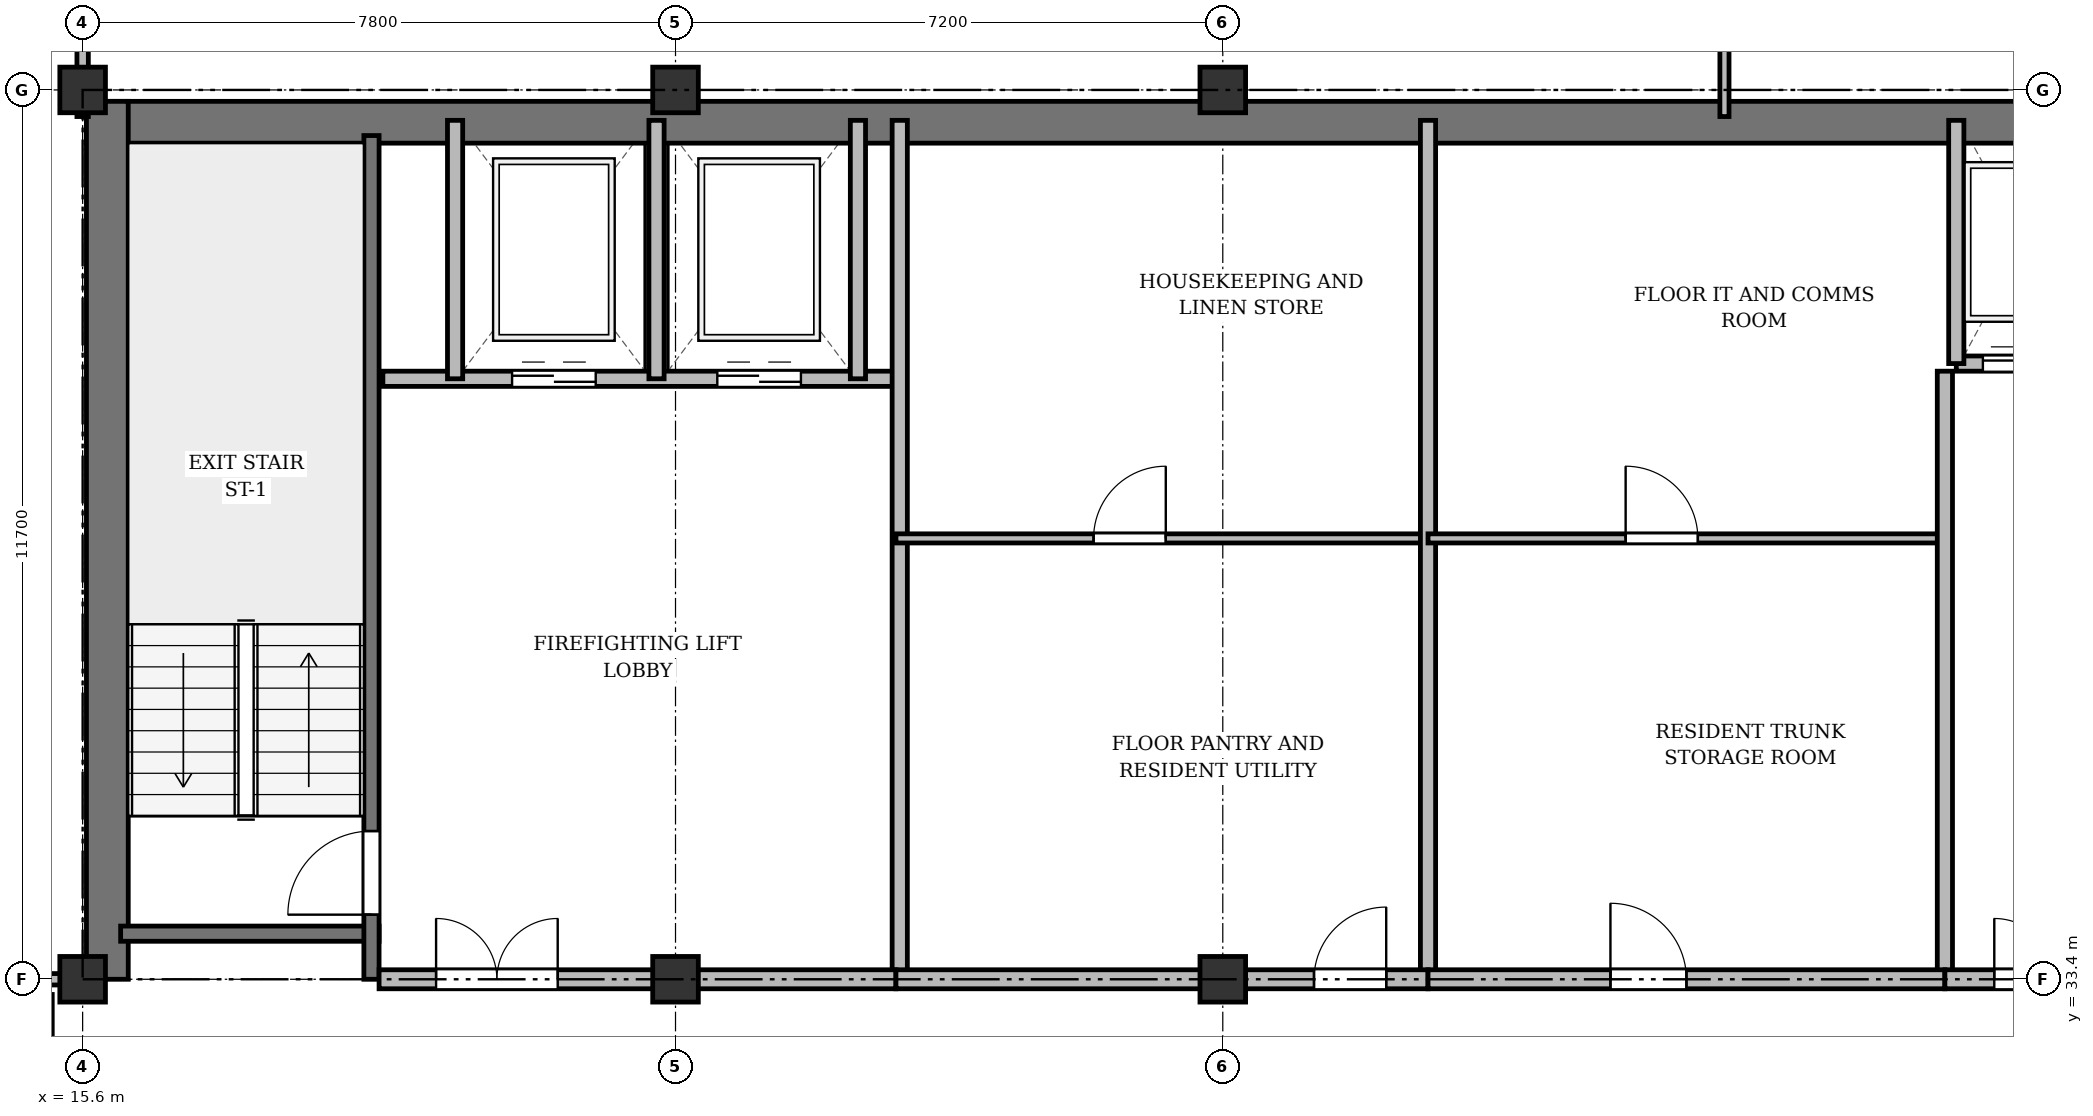
"""IFC4 building model, lengths in metres.
Left out: names, types, materials, properties, quantities, classifications, styles, units other than length and angle.
Written with IfcOpenShell. Run it as: python <this file> out.ifc"""

import sys

from ifc_helpers import new_model, si_unit, direction, frame, frame_2d, origin, origin_2d, place, context, subcontext, project, spatial, rectangle, extrude, source, transform, mapped, element, fill, save


model = new_model("IFC4")
c1 = context("Model", 3, precision=1e-05, world=origin(), true_north=direction((0.0, 1.0)))
c2 = subcontext(c1, "Body", "Model", "MODEL_VIEW")
j1 = project(units=[si_unit("LENGTHUNIT", "METRE"), si_unit("PLANEANGLEUNIT", "RADIAN")], contexts=[c1])
p1 = place(None, origin())
s1 = spatial("IfcSite", under=j1, at=p1, CompositionType="ELEMENT")
p2 = place(p1, origin())
s2 = spatial("IfcBuilding", under=s1, at=p2, CompositionType="ELEMENT")
p3 = place(p2, frame((0.0, 0.0, 295.5)))
s3 = spatial("IfcBuildingStorey", under=s2, at=p3, CompositionType="ELEMENT", Elevation=295.5)
m1 = source(origin(), c2, "Body", "SweptSolid", [
    extrude(rectangle(XDim=0.6, YDim=0.6, at=origin_2d()), origin(), (0.0, 0.0, 1.0), 3.6),
])
for number, where, z_axis, x_axis in (
    (1, (15.6, 33.4, 0.0), (0.0, 0.0, 1.0), (1.0, 0.0, 0.0)),
    (2, (15.6, 45.1, 0.0), (0.0, 0.0, 1.0), (1.0, 0.0, 0.0)),
    (3, (23.4, 33.4, 0.0), (0.0, 0.0, 1.0), (1.0, 0.0, 0.0)),
    (4, (23.4, 45.1, 0.0), (0.0, 0.0, 1.0), (1.0, 0.0, 0.0)),
    (5, (30.6, 33.4, 0.0), (0.0, 0.0, 1.0), (1.0, 0.0, 0.0)),
    (6, (30.6, 45.1, 0.0), (0.0, 0.0, 1.0), (1.0, 0.0, 0.0)),
):
    element("IfcColumn", number, at=place(p3, frame(where, z_axis=z_axis, x_axis=x_axis)), inside=s3, PredefinedType="COLUMN", context=c2, shape_type="MappedRepresentation", body=[
        mapped(m1, transform((0.0, 0.0, 0.0), x_axis=(1.0, 0.0, 0.0), y_axis=(0.0, 1.0, 0.0), z_axis=(0.0, 0.0, 1.0), scale=1.0)),
    ])
p4 = place(p3, frame((15.65, 44.675, 0.0), z_axis=(0.0, 0.0, 1.0), x_axis=(1.0, 0.0, 0.0)))
e7 = element("IfcWall", 7, at=p4, inside=s3, PredefinedType="SHEAR", context=c2, shape_type="SweptSolid", body=[
    extrude(rectangle(XDim=43.1, YDim=0.55, at=frame_2d((21.55, 0.0))), origin(), (0.0, 0.0, 1.0), 3.26),
])
p5 = place(p3, frame((15.925, 33.4, 0.0), z_axis=(0.0, 0.0, 1.0), x_axis=(0.0, 1.0, 0.0)))
e8 = element("IfcWall", 8, at=p5, inside=s3, PredefinedType="SHEAR", context=c2, shape_type="SweptSolid", body=[
    extrude(rectangle(XDim=11.55, YDim=0.55, at=frame_2d((5.775, 0.0))), origin(), (0.0, 0.0, 1.0), 3.26),
])
p6 = place(p3, frame((16.1, 34.0, 0.0), z_axis=(0.0, 0.0, 1.0), x_axis=(1.0, 0.0, 0.0)))
e9 = element("IfcWall", 9, at=p6, inside=s3, PredefinedType="SHEAR", context=c2, shape_type="SweptSolid", body=[
    extrude(rectangle(XDim=3.4, YDim=0.2, at=frame_2d((1.7, 0.0))), origin(), (0.0, 0.0, 1.0), 3.26),
])
p7 = place(p3, frame((19.4, 33.4, 0.0), z_axis=(0.0, 0.0, 1.0), x_axis=(0.0, 1.0, 0.0)))
e10 = element("IfcWall", 10, at=p7, inside=s3, PredefinedType="SHEAR", context=c2, shape_type="SweptSolid", body=[
    extrude(rectangle(XDim=11.1, YDim=0.2, at=frame_2d((5.55, 0.0))), origin(), (0.0, 0.0, 1.0), 3.26),
])
p8 = place(p7, frame((0.85, 0.0, 0.0)))
e11 = element("IfcOpeningElement", 11, at=p8, cuts=e10, PredefinedType="OPENING", context=c2, shape_type="SweptSolid", body=[
    extrude(rectangle(XDim=1.1, YDim=2.15, at=frame_2d((0.55, 1.075))), frame((0.0, 0.11, 0.0), z_axis=(0.0, -1.0, 0.0), x_axis=(1.0, 0.0, 0.0)), (0.0, 0.0, 1.0), 0.22),
])
p9 = place(p3, frame((15.1, 23.2, 0.0), z_axis=(0.0, 0.0, 1.0), x_axis=(0.0, 1.0, 0.0)))
e12 = element("IfcWall", 12, at=p9, inside=s3, PredefinedType="SHEAR", context=c2, shape_type="SweptSolid", body=[
    extrude(rectangle(XDim=10.0, YDim=0.2, at=frame_2d((5.0, 0.0))), origin(), (0.0, 0.0, 1.0), 3.26),
])
p10 = place(p3, frame((19.55, 41.3, 0.0), z_axis=(0.0, 0.0, 1.0), x_axis=(1.0, 0.0, 0.0)))
e13 = element("IfcWall", 13, at=p10, inside=s3, PredefinedType="SOLIDWALL", context=c2, shape_type="SweptSolid", body=[
    extrude(rectangle(XDim=6.75, YDim=0.2, at=frame_2d((3.375, 0.0))), origin(), (0.0, 0.0, 1.0), 3.26),
])
p11 = place(p10, frame((1.7, 0.0, 0.0)))
e14 = element("IfcOpeningElement", 14, at=p11, cuts=e13, PredefinedType="OPENING", context=c2, shape_type="SweptSolid", body=[
    extrude(rectangle(XDim=1.1, YDim=2.15, at=frame_2d((0.55, 1.075))), frame((0.0, 0.11, 0.0), z_axis=(0.0, -1.0, 0.0), x_axis=(1.0, 0.0, 0.0)), (0.0, 0.0, 1.0), 0.22),
])
p12 = place(p10, frame((4.4, 0.0, 0.0)))
e15 = element("IfcOpeningElement", 15, at=p12, cuts=e13, PredefinedType="OPENING", context=c2, shape_type="SweptSolid", body=[
    extrude(rectangle(XDim=1.1, YDim=2.15, at=frame_2d((0.55, 1.075))), frame((0.0, 0.11, 0.0), z_axis=(0.0, -1.0, 0.0), x_axis=(1.0, 0.0, 0.0)), (0.0, 0.0, 1.0), 0.22),
])
for number, where, z_axis, x_axis in (
    (16, (20.5, 41.3, 0.0), (0.0, 0.0, 1.0), (0.0, 1.0, 0.0)),
    (17, (23.15, 41.3, 0.0), (0.0, 0.0, 1.0), (0.0, 1.0, 0.0)),
    (18, (25.8, 41.3, 0.0), (0.0, 0.0, 1.0), (0.0, 1.0, 0.0)),
):
    element("IfcWall", number, at=place(p3, frame(where, z_axis=z_axis, x_axis=x_axis)), inside=s3, PredefinedType="SOLIDWALL", context=c2, shape_type="SweptSolid", body=[
        extrude(rectangle(XDim=3.4, YDim=0.2, at=frame_2d((1.7, 0.0))), origin(), (0.0, 0.0, 1.0), 3.26),
    ])
p13 = place(p3, frame((26.35, 33.4, 0.0), z_axis=(0.0, 0.0, 1.0), x_axis=(0.0, 1.0, 0.0)))
e19 = element("IfcWall", 19, at=p13, inside=s3, PredefinedType="SOLIDWALL", context=c2, shape_type="SweptSolid", body=[
    extrude(rectangle(XDim=11.3, YDim=0.2, at=frame_2d((5.65, 0.0))), origin(), (0.0, 0.0, 1.0), 2.81),
])
p14 = place(p3, frame((19.5, 33.4, 0.0), z_axis=(0.0, 0.0, 1.0), x_axis=(1.0, 0.0, 0.0)))
e20 = element("IfcWall", 20, at=p14, inside=s3, PredefinedType="PARTITIONING", context=c2, shape_type="SweptSolid", body=[
    extrude(rectangle(XDim=6.8, YDim=0.25, at=frame_2d((3.4, 0.0))), origin(), (0.0, 0.0, 1.0), 2.81),
])
p15 = place(p14, frame((0.75, 0.0, 0.0)))
e21 = element("IfcOpeningElement", 21, at=p15, cuts=e20, PredefinedType="OPENING", context=c2, shape_type="SweptSolid", body=[
    extrude(rectangle(XDim=1.6, YDim=2.2, at=frame_2d((0.8, 1.1))), frame((0.0, 0.135, 0.0), z_axis=(0.0, -1.0, 0.0), x_axis=(1.0, 0.0, 0.0)), (0.0, 0.0, 1.0), 0.27),
])
p16 = place(p3, frame((26.3, 39.2, 0.0), z_axis=(0.0, 0.0, 1.0), x_axis=(1.0, 0.0, 0.0)))
e22 = element("IfcWall", 22, at=p16, inside=s3, PredefinedType="PARTITIONING", context=c2, shape_type="SweptSolid", body=[
    extrude(rectangle(XDim=7.0, YDim=0.12, at=frame_2d((3.5, 0.0))), origin(), (0.0, 0.0, 1.0), 2.76),
])
p17 = place(p16, frame((2.6, 0.0, 0.0)))
e23 = element("IfcOpeningElement", 23, at=p17, cuts=e22, PredefinedType="OPENING", context=c2, shape_type="SweptSolid", body=[
    extrude(rectangle(XDim=0.95, YDim=2.15, at=frame_2d((0.475, 1.075))), frame((0.0, 0.07, 0.0), z_axis=(0.0, -1.0, 0.0), x_axis=(1.0, 0.0, 0.0)), (0.0, 0.0, 1.0), 0.14),
])
p18 = place(p3, frame((33.3, 33.4, 0.0), z_axis=(0.0, 0.0, 1.0), x_axis=(0.0, 1.0, 0.0)))
e24 = element("IfcWall", 24, at=p18, inside=s3, PredefinedType="SOLIDWALL", context=c2, shape_type="SweptSolid", body=[
    extrude(rectangle(XDim=11.3, YDim=0.2, at=frame_2d((5.65, 0.0))), origin(), (0.0, 0.0, 1.0), 2.81),
])
p19 = place(p3, frame((33.3, 39.2, 0.0), z_axis=(0.0, 0.0, 1.0), x_axis=(1.0, 0.0, 0.0)))
e25 = element("IfcWall", 25, at=p19, inside=s3, PredefinedType="PARTITIONING", context=c2, shape_type="SweptSolid", body=[
    extrude(rectangle(XDim=6.8, YDim=0.12, at=frame_2d((3.4, 0.0))), origin(), (0.0, 0.0, 1.0), 3.26),
])
p20 = place(p19, frame((2.6, 0.0, 0.0)))
e26 = element("IfcOpeningElement", 26, at=p20, cuts=e25, PredefinedType="OPENING", context=c2, shape_type="SweptSolid", body=[
    extrude(rectangle(XDim=0.95, YDim=2.15, at=frame_2d((0.475, 1.075))), frame((0.0, 0.07, 0.0), z_axis=(0.0, -1.0, 0.0), x_axis=(1.0, 0.0, 0.0)), (0.0, 0.0, 1.0), 0.14),
])
p21 = place(p3, frame((40.1, 33.4, 0.0), z_axis=(0.0, 0.0, 1.0), x_axis=(0.0, 1.0, 0.0)))
e27 = element("IfcWall", 27, at=p21, inside=s3, PredefinedType="SOLIDWALL", context=c2, shape_type="SweptSolid", body=[
    extrude(rectangle(XDim=8.0, YDim=0.2, at=frame_2d((4.0, 0.0))), origin(), (0.0, 0.0, 1.0), 2.81),
])
p22 = place(p3, frame((40.25, 41.5, 0.0), z_axis=(0.0, 0.0, 1.0), x_axis=(1.0, 0.0, 0.0)))
e28 = element("IfcWall", 28, at=p22, inside=s3, PredefinedType="SOLIDWALL", context=c2, shape_type="SweptSolid", body=[
    extrude(rectangle(XDim=6.9, YDim=0.2, at=frame_2d((3.45, 0.0))), origin(), (0.0, 0.0, 1.0), 3.26),
])
p23 = place(p22, frame((0.35, 0.0, 0.0)))
e29 = element("IfcOpeningElement", 29, at=p23, cuts=e28, PredefinedType="OPENING", context=c2, shape_type="SweptSolid", body=[
    extrude(rectangle(XDim=1.05, YDim=2.15, at=frame_2d((0.525, 1.075))), frame((0.0, 0.11, 0.0), z_axis=(0.0, -1.0, 0.0), x_axis=(1.0, 0.0, 0.0)), (0.0, 0.0, 1.0), 0.22),
])
p24 = place(p22, frame((2.05, 0.0, 0.0)))
e30 = element("IfcOpeningElement", 30, at=p24, cuts=e28, PredefinedType="OPENING", context=c2, shape_type="SweptSolid", body=[
    extrude(rectangle(XDim=1.05, YDim=2.15, at=frame_2d((0.525, 1.075))), frame((0.0, 0.11, 0.0), z_axis=(0.0, -1.0, 0.0), x_axis=(1.0, 0.0, 0.0)), (0.0, 0.0, 1.0), 0.22),
])
p25 = place(p22, frame((3.75, 0.0, 0.0)))
e31 = element("IfcOpeningElement", 31, at=p25, cuts=e28, PredefinedType="OPENING", context=c2, shape_type="SweptSolid", body=[
    extrude(rectangle(XDim=1.05, YDim=2.15, at=frame_2d((0.525, 1.075))), frame((0.0, 0.11, 0.0), z_axis=(0.0, -1.0, 0.0), x_axis=(1.0, 0.0, 0.0)), (0.0, 0.0, 1.0), 0.22),
])
p26 = place(p22, frame((5.45, 0.0, 0.0)))
e32 = element("IfcOpeningElement", 32, at=p26, cuts=e28, PredefinedType="OPENING", context=c2, shape_type="SweptSolid", body=[
    extrude(rectangle(XDim=1.05, YDim=2.15, at=frame_2d((0.525, 1.075))), frame((0.0, 0.11, 0.0), z_axis=(0.0, -1.0, 0.0), x_axis=(1.0, 0.0, 0.0)), (0.0, 0.0, 1.0), 0.22),
])
p27 = place(p3, frame((40.25, 41.5, 0.0), z_axis=(0.0, 0.0, 1.0), x_axis=(0.0, 1.0, 0.0)))
e33 = element("IfcWall", 33, at=p27, inside=s3, PredefinedType="SOLIDWALL", context=c2, shape_type="SweptSolid", body=[
    extrude(rectangle(XDim=3.2, YDim=0.2, at=frame_2d((1.6, 0.0))), origin(), (0.0, 0.0, 1.0), 3.26),
])
p28 = place(p3, frame((26.3, 33.4, 0.0), z_axis=(0.0, 0.0, 1.0), x_axis=(1.0, 0.0, 0.0)))
e34 = element("IfcWall", 34, at=p28, inside=s3, PredefinedType="PARTITIONING", context=c2, shape_type="SweptSolid", body=[
    extrude(rectangle(XDim=7.0, YDim=0.25, at=frame_2d((3.5, 0.0))), origin(), (0.0, 0.0, 1.0), 2.81),
])
p29 = place(p28, frame((5.5, 0.0, 0.0)))
e35 = element("IfcOpeningElement", 35, at=p29, cuts=e34, PredefinedType="OPENING", context=c2, shape_type="SweptSolid", body=[
    extrude(rectangle(XDim=0.95, YDim=2.15, at=frame_2d((0.475, 1.075))), frame((0.0, 0.135, 0.0), z_axis=(0.0, -1.0, 0.0), x_axis=(1.0, 0.0, 0.0)), (0.0, 0.0, 1.0), 0.27),
])
p30 = place(p3, frame((33.3, 33.4, 0.0), z_axis=(0.0, 0.0, 1.0), x_axis=(1.0, 0.0, 0.0)))
e36 = element("IfcWall", 36, at=p30, inside=s3, PredefinedType="PARTITIONING", context=c2, shape_type="SweptSolid", body=[
    extrude(rectangle(XDim=6.8, YDim=0.25, at=frame_2d((3.4, 0.0))), origin(), (0.0, 0.0, 1.0), 2.81),
])
p31 = place(p30, frame((2.4, 0.0, 0.0)))
e37 = element("IfcOpeningElement", 37, at=p31, cuts=e36, PredefinedType="OPENING", context=c2, shape_type="SweptSolid", body=[
    extrude(rectangle(XDim=1.0, YDim=2.15, at=frame_2d((0.5, 1.075))), frame((0.0, 0.135, 0.0), z_axis=(0.0, -1.0, 0.0), x_axis=(1.0, 0.0, 0.0)), (0.0, 0.0, 1.0), 0.27),
])
p32 = place(p3, frame((40.1, 33.4, 0.0), z_axis=(0.0, 0.0, 1.0), x_axis=(1.0, 0.0, 0.0)))
e38 = element("IfcWall", 38, at=p32, inside=s3, PredefinedType="PARTITIONING", context=c2, shape_type="SweptSolid", body=[
    extrude(rectangle(XDim=7.05, YDim=0.25, at=frame_2d((3.525, 0.0))), origin(), (0.0, 0.0, 1.0), 2.81),
])
p33 = place(p32, frame((0.65, 0.0, 0.0)))
e39 = element("IfcOpeningElement", 39, at=p33, cuts=e38, PredefinedType="OPENING", context=c2, shape_type="SweptSolid", body=[
    extrude(rectangle(XDim=1.6, YDim=2.2, at=frame_2d((0.8, 1.1))), frame((0.0, 0.135, 0.0), z_axis=(0.0, -1.0, 0.0), x_axis=(1.0, 0.0, 0.0)), (0.0, 0.0, 1.0), 0.27),
])
p34 = place(p3, frame((8.45, 33.4, 0.0), z_axis=(0.0, 0.0, 1.0), x_axis=(1.0, 0.0, 0.0)))
e40 = element("IfcWall", 40, at=p34, inside=s3, PredefinedType="PARTITIONING", context=c2, shape_type="SweptSolid", body=[
    extrude(rectangle(XDim=7.15, YDim=0.15, at=frame_2d((3.575, 0.0))), origin(), (0.0, 0.0, 1.0), 2.81),
])
p35 = place(p34, frame((0.95, 0.0, 0.0)))
e41 = element("IfcOpeningElement", 41, at=p35, cuts=e40, PredefinedType="OPENING", context=c2, shape_type="SweptSolid", body=[
    extrude(rectangle(XDim=0.95, YDim=2.15, at=frame_2d((0.475, 1.075))), frame((0.0, 0.085, 0.0), z_axis=(0.0, -1.0, 0.0), x_axis=(1.0, 0.0, 0.0)), (0.0, 0.0, 1.0), 0.17),
])
p36 = place(p3, frame((37.2, 44.75, 0.0), z_axis=(0.0, 0.0, 1.0), x_axis=(0.0, 1.0, 0.0)))
e42 = element("IfcWall", 42, at=p36, inside=s3, PredefinedType="PARTITIONING", context=c2, shape_type="SweptSolid", body=[
    extrude(rectangle(XDim=3.61, YDim=0.12, at=frame_2d((1.805, 0.0))), origin(), (0.0, 0.0, 1.0), 2.81),
])
p37 = place(p36, frame((1.1, 0.0, 0.0)))
e43 = element("IfcOpeningElement", 43, at=p37, cuts=e42, PredefinedType="OPENING", context=c2, shape_type="SweptSolid", body=[
    extrude(rectangle(XDim=0.95, YDim=2.15, at=frame_2d((0.475, 1.075))), frame((0.0, 0.07, 0.0), z_axis=(0.0, -1.0, 0.0), x_axis=(1.0, 0.0, 0.0)), (0.0, 0.0, 1.0), 0.14),
])
p38 = place(p3, frame((15.6, 44.75, 0.0), z_axis=(0.0, 0.0, 1.0), x_axis=(0.0, 1.0, 0.0)))
e44 = element("IfcWall", 44, at=p38, inside=s3, PredefinedType="PARTITIONING", context=c2, shape_type="SweptSolid", body=[
    extrude(rectangle(XDim=3.61, YDim=0.15, at=frame_2d((1.805, 0.0))), origin(), (0.0, 0.0, 1.0), 2.76),
])
p39 = place(p38, frame((1.1, 0.0, 0.0)))
e45 = element("IfcOpeningElement", 45, at=p39, cuts=e44, PredefinedType="OPENING", context=c2, shape_type="SweptSolid", body=[
    extrude(rectangle(XDim=0.95, YDim=2.15, at=frame_2d((0.475, 1.075))), frame((0.0, 0.085, 0.0), z_axis=(0.0, -1.0, 0.0), x_axis=(1.0, 0.0, 0.0)), (0.0, 0.0, 1.0), 0.17),
])
m2 = source(origin(), c2, "Body", "SweptSolid", [
    extrude(rectangle(XDim=1.1, YDim=2.15, at=frame_2d((0.55, 1.075))), frame((0.0, 0.025, 0.0), z_axis=(0.0, -1.0, 0.0), x_axis=(1.0, 0.0, 0.0)), (0.0, 0.0, 1.0), 0.05),
])
p40 = place(p8, origin())
e46 = element("IfcDoor", 46, at=p40, inside=s3, OperationType="SINGLE_SWING_LEFT", PredefinedType="DOOR", context=c2, shape_type="MappedRepresentation", body=[
    mapped(m2, transform((0.0, 0.0, 0.0), x_axis=(1.0, 0.0, 0.0), y_axis=(0.0, 1.0, 0.0), z_axis=(0.0, 0.0, 1.0), scale=1.0)),
])
fill(e11, e46)
p41 = place(p11, origin())
e47 = element("IfcDoor", 47, at=p41, inside=s3, OperationType="DOUBLE_DOOR_SLIDING", PredefinedType="DOOR", context=c2, shape_type="MappedRepresentation", body=[
    mapped(m2, transform((0.0, 0.0, 0.0), x_axis=(1.0, 0.0, 0.0), y_axis=(0.0, 1.0, 0.0), z_axis=(0.0, 0.0, 1.0), scale=1.0)),
])
fill(e14, e47)
p42 = place(p12, origin())
e48 = element("IfcDoor", 48, at=p42, inside=s3, OperationType="DOUBLE_DOOR_SLIDING", PredefinedType="DOOR", context=c2, shape_type="MappedRepresentation", body=[
    mapped(m2, transform((0.0, 0.0, 0.0), x_axis=(1.0, 0.0, 0.0), y_axis=(0.0, 1.0, 0.0), z_axis=(0.0, 0.0, 1.0), scale=1.0)),
])
fill(e15, e48)
m3 = source(origin(), c2, "Body", "SweptSolid", [
    extrude(rectangle(XDim=1.6, YDim=2.2, at=frame_2d((0.8, 1.1))), frame((0.0, 0.025, 0.0), z_axis=(0.0, -1.0, 0.0), x_axis=(1.0, 0.0, 0.0)), (0.0, 0.0, 1.0), 0.05),
])
p43 = place(p15, origin())
e49 = element("IfcDoor", 49, at=p43, inside=s3, OperationType="DOUBLE_DOOR_SINGLE_SWING", PredefinedType="DOOR", context=c2, shape_type="MappedRepresentation", body=[
    mapped(m3, transform((0.0, 0.0, 0.0), x_axis=(1.0, 0.0, 0.0), y_axis=(0.0, 1.0, 0.0), z_axis=(0.0, 0.0, 1.0), scale=1.0)),
])
fill(e21, e49)
m4 = source(origin(), c2, "Body", "SweptSolid", [
    extrude(rectangle(XDim=0.95, YDim=2.15, at=frame_2d((0.475, 1.075))), frame((0.0, 0.025, 0.0), z_axis=(0.0, -1.0, 0.0), x_axis=(1.0, 0.0, 0.0)), (0.0, 0.0, 1.0), 0.05),
])
p44 = place(p17, origin())
e50 = element("IfcDoor", 50, at=p44, inside=s3, OperationType="SINGLE_SWING_RIGHT", PredefinedType="DOOR", context=c2, shape_type="MappedRepresentation", body=[
    mapped(m4, transform((0.0, 0.0, 0.0), x_axis=(1.0, 0.0, 0.0), y_axis=(0.0, 1.0, 0.0), z_axis=(0.0, 0.0, 1.0), scale=1.0)),
])
fill(e23, e50)
p45 = place(p20, origin())
e51 = element("IfcDoor", 51, at=p45, inside=s3, OperationType="SINGLE_SWING_LEFT", PredefinedType="DOOR", context=c2, shape_type="MappedRepresentation", body=[
    mapped(m4, transform((0.0, 0.0, 0.0), x_axis=(1.0, 0.0, 0.0), y_axis=(0.0, 1.0, 0.0), z_axis=(0.0, 0.0, 1.0), scale=1.0)),
])
fill(e26, e51)
m5 = source(origin(), c2, "Body", "SweptSolid", [
    extrude(rectangle(XDim=1.05, YDim=2.15, at=frame_2d((0.525, 1.075))), frame((0.0, 0.025, 0.0), z_axis=(0.0, -1.0, 0.0), x_axis=(1.0, 0.0, 0.0)), (0.0, 0.0, 1.0), 0.05),
])
p46 = place(p23, origin())
e52 = element("IfcDoor", 52, at=p46, inside=s3, OperationType="DOUBLE_DOOR_SLIDING", PredefinedType="DOOR", context=c2, shape_type="MappedRepresentation", body=[
    mapped(m5, transform((0.0, 0.0, 0.0), x_axis=(1.0, 0.0, 0.0), y_axis=(0.0, 1.0, 0.0), z_axis=(0.0, 0.0, 1.0), scale=1.0)),
])
fill(e29, e52)
p47 = place(p29, origin())
e53 = element("IfcDoor", 53, at=p47, inside=s3, OperationType="SINGLE_SWING_RIGHT", PredefinedType="DOOR", context=c2, shape_type="MappedRepresentation", body=[
    mapped(m4, transform((0.0, 0.0, 0.0), x_axis=(1.0, 0.0, 0.0), y_axis=(0.0, 1.0, 0.0), z_axis=(0.0, 0.0, 1.0), scale=1.0)),
])
fill(e35, e53)
m6 = source(origin(), c2, "Body", "SweptSolid", [
    extrude(rectangle(XDim=1.0, YDim=2.15, at=frame_2d((0.5, 1.075))), frame((0.0, 0.025, 0.0), z_axis=(0.0, -1.0, 0.0), x_axis=(1.0, 0.0, 0.0)), (0.0, 0.0, 1.0), 0.05),
])
p48 = place(p31, origin())
e54 = element("IfcDoor", 54, at=p48, inside=s3, OperationType="SINGLE_SWING_LEFT", PredefinedType="DOOR", context=c2, shape_type="MappedRepresentation", body=[
    mapped(m6, transform((0.0, 0.0, 0.0), x_axis=(1.0, 0.0, 0.0), y_axis=(0.0, 1.0, 0.0), z_axis=(0.0, 0.0, 1.0), scale=1.0)),
])
fill(e37, e54)
p49 = place(p33, origin())
e55 = element("IfcDoor", 55, at=p49, inside=s3, OperationType="DOUBLE_DOOR_SINGLE_SWING", PredefinedType="DOOR", context=c2, shape_type="MappedRepresentation", body=[
    mapped(m3, transform((0.0, 0.0, 0.0), x_axis=(1.0, 0.0, 0.0), y_axis=(0.0, 1.0, 0.0), z_axis=(0.0, 0.0, 1.0), scale=1.0)),
])
fill(e39, e55)
save(model, sys.argv[1])
